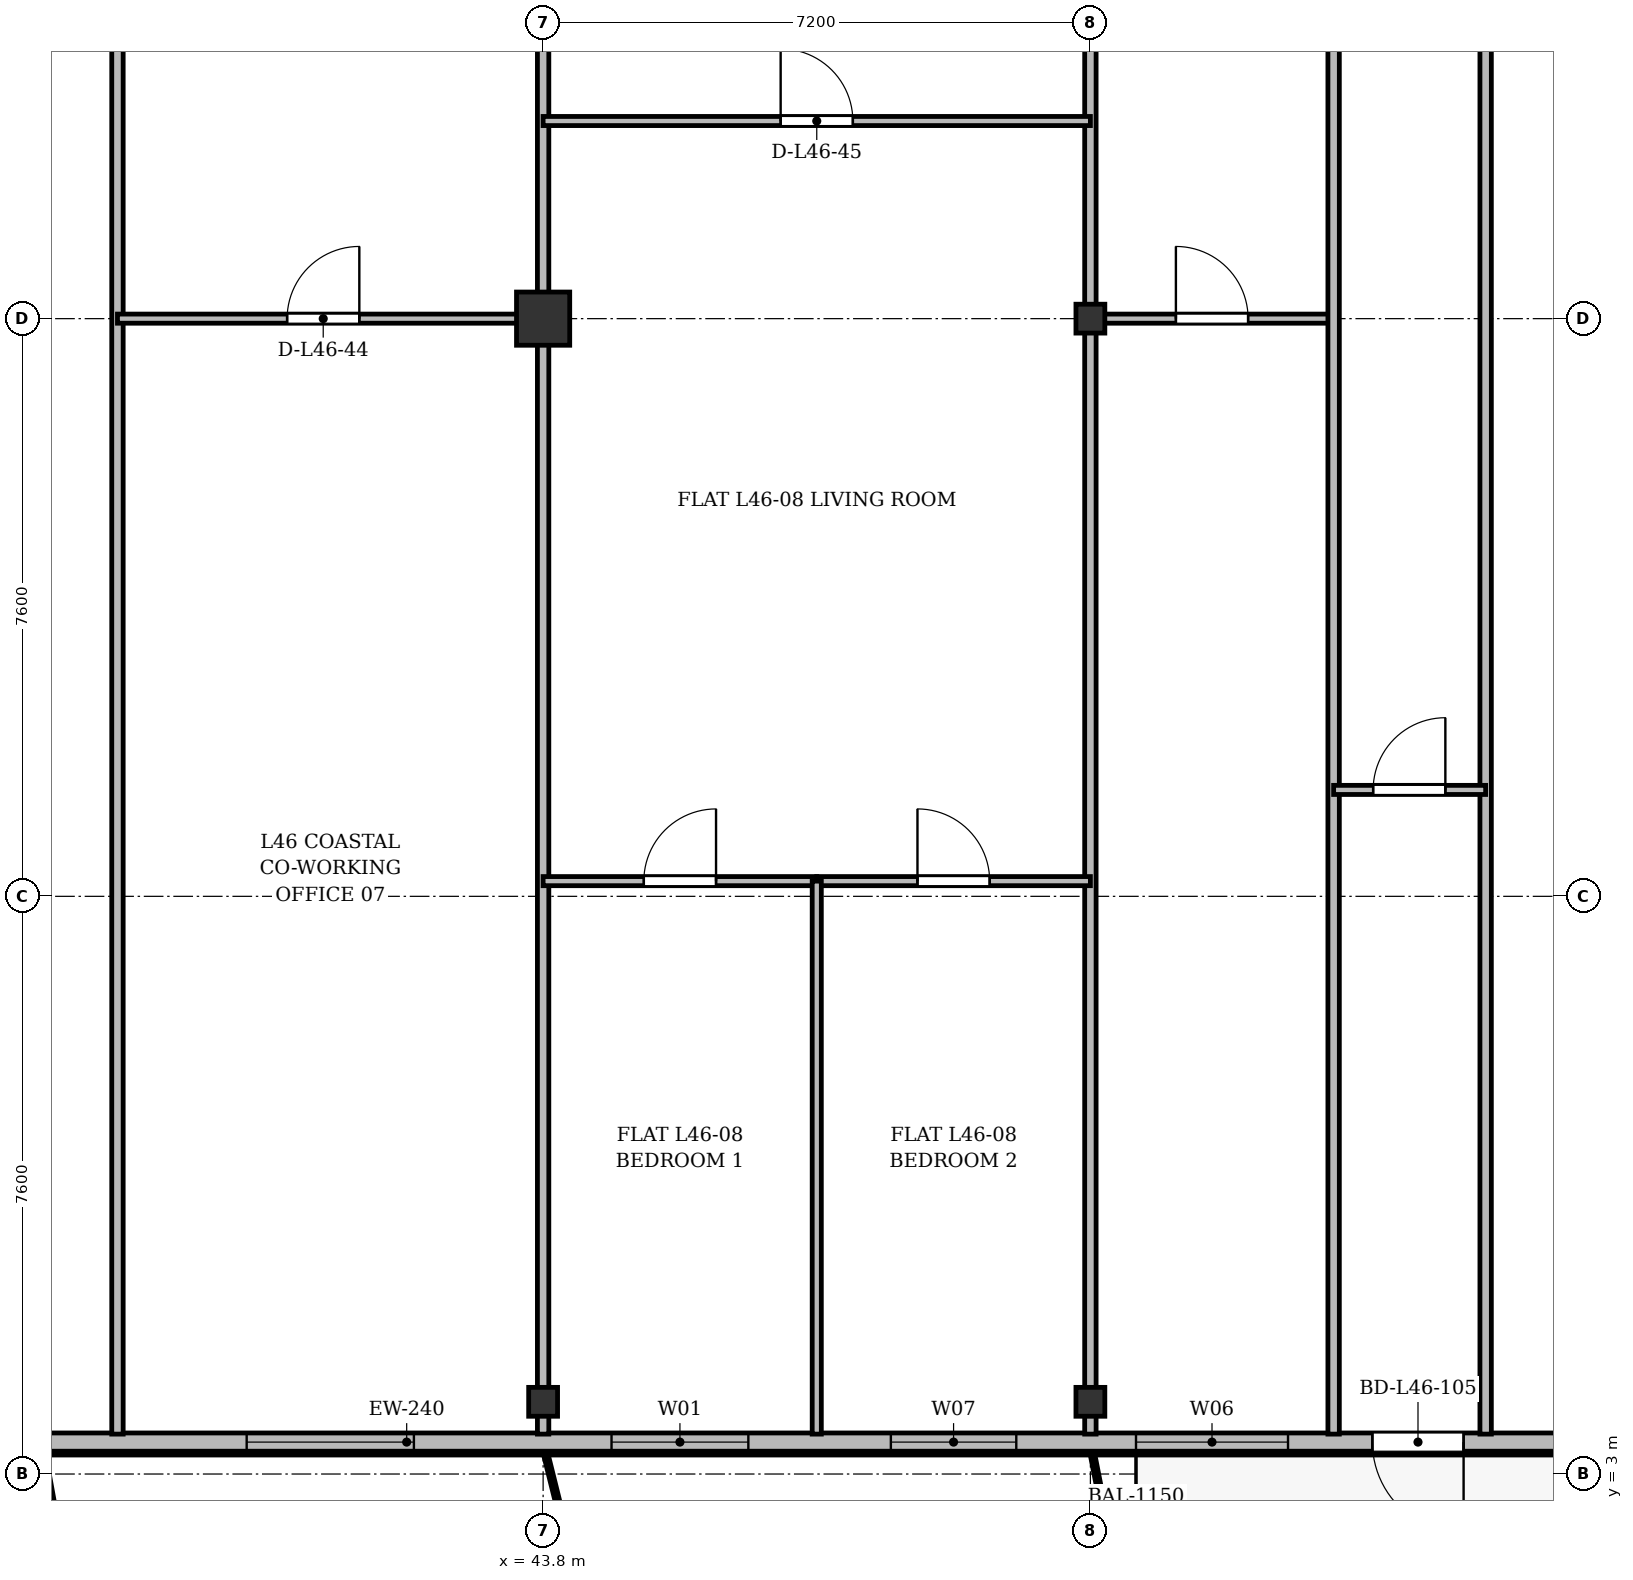
"""IFC4 building model, lengths in metres.
Left out: names, types, materials, properties, quantities, classifications, styles, units other than length and angle.
Written with IfcOpenShell. Run it as: python <this file> out.ifc"""

import sys

from ifc_helpers import new_model, si_unit, direction, frame, frame_2d, origin, origin_2d, place, context, subcontext, project, spatial, rectangle, i_section, extrude, source, transform, mapped, element, fill, save


model = new_model("IFC4")
c1 = context("Model", 3, precision=1e-05, world=origin(), true_north=direction((0.0, 1.0)))
c2 = subcontext(c1, "Body", "Model", "MODEL_VIEW")
j1 = project(units=[si_unit("LENGTHUNIT", "METRE"), si_unit("PLANEANGLEUNIT", "RADIAN")], contexts=[c1])
p1 = place(None, origin())
s1 = spatial("IfcSite", under=j1, at=p1, CompositionType="ELEMENT")
p2 = place(p1, origin())
s2 = spatial("IfcBuilding", under=s1, at=p2, CompositionType="ELEMENT")
p3 = place(p2, frame((0.0, 0.0, 175.3)))
s3 = spatial("IfcBuildingStorey", under=s2, at=p3, CompositionType="ELEMENT", Elevation=175.3)
m1 = source(origin(), c2, "Body", "SweptSolid", [
    extrude(i_section(OverallWidth=0.38, OverallDepth=0.38, WebThickness=0.02, FlangeThickness=0.03, at=origin_2d()), origin(), (0.0, 0.0, 1.0), 3.6),
])
p4 = place(p3, frame((43.8, 3.95, 0.0), z_axis=(0.0, 0.0, 1.0), x_axis=(1.0, 0.0, 0.0)))
e1 = element("IfcColumn", 1, at=p4, inside=s3, PredefinedType="COLUMN", context=c2, shape_type="MappedRepresentation", body=[
    mapped(m1, transform((0.0, 0.0, 0.0), x_axis=(1.0, 0.0, 0.0), y_axis=(0.0, 1.0, 0.0), z_axis=(0.0, 0.0, 1.0), scale=1.0)),
])
m2 = source(origin(), c2, "Body", "SweptSolid", [
    extrude(rectangle(XDim=0.7, YDim=0.7, at=origin_2d()), origin(), (0.0, 0.0, 1.0), 3.6),
])
p5 = place(p3, frame((43.8, 18.2, 0.0), z_axis=(0.0, 0.0, 1.0), x_axis=(1.0, 0.0, 0.0)))
e2 = element("IfcColumn", 2, at=p5, inside=s3, PredefinedType="COLUMN", context=c2, shape_type="MappedRepresentation", body=[
    mapped(m2, transform((0.0, 0.0, 0.0), x_axis=(1.0, 0.0, 0.0), y_axis=(0.0, 1.0, 0.0), z_axis=(0.0, 0.0, 1.0), scale=1.0)),
])
for number, where, z_axis, x_axis in (
    (3, (51.0, 3.95, 0.0), (0.0, 0.0, 1.0), (1.0, 0.0, 0.0)),
    (4, (51.0, 18.2, 0.0), (0.0, 0.0, 1.0), (1.0, 0.0, 0.0)),
):
    element("IfcColumn", number, at=place(p3, frame(where, z_axis=z_axis, x_axis=x_axis)), inside=s3, PredefinedType="COLUMN", context=c2, shape_type="MappedRepresentation", body=[
        mapped(m1, transform((0.0, 0.0, 0.0), x_axis=(1.0, 0.0, 0.0), y_axis=(0.0, 1.0, 0.0), z_axis=(0.0, 0.0, 1.0), scale=1.0)),
    ])
p6 = place(p3, frame((63.6, 3.42, 0.0), z_axis=(0.0, 0.0, 1.0), x_axis=(-1.0, 0.0, 0.0)))
e5 = element("IfcWall", 5, at=p6, inside=s3, PredefinedType="SOLIDWALL", context=c2, shape_type="SweptSolid", body=[
    extrude(rectangle(XDim=34.0, YDim=0.24, at=frame_2d((17.0, 0.0))), origin(), (0.0, 0.0, 1.0), 3.35),
])
p7 = place(p6, frame((2.645, 0.0, 0.9)))
e6 = element("IfcOpeningElement", 6, at=p7, cuts=e5, PredefinedType="OPENING", context=c2, shape_type="SweptSolid", body=[
    extrude(rectangle(XDim=2.2, YDim=1.8, at=frame_2d((1.1, 0.9))), frame((0.0, 0.13, 0.0), z_axis=(0.0, -1.0, 0.0), x_axis=(1.0, 0.0, 0.0)), (0.0, 0.0, 1.0), 0.26),
])
p8 = place(p6, frame((7.69, 0.0, 0.0)))
e7 = element("IfcOpeningElement", 7, at=p8, cuts=e5, PredefinedType="OPENING", context=c2, shape_type="SweptSolid", body=[
    extrude(rectangle(XDim=1.2, YDim=2.2, at=frame_2d((0.6, 1.1))), frame((0.0, 0.13, 0.0), z_axis=(0.0, -1.0, 0.0), x_axis=(1.0, 0.0, 0.0)), (0.0, 0.0, 1.0), 0.26),
])
p9 = place(p6, frame((10.0, 0.0, 0.9)))
e8 = element("IfcOpeningElement", 8, at=p9, cuts=e5, PredefinedType="OPENING", context=c2, shape_type="SweptSolid", body=[
    extrude(rectangle(XDim=2.0, YDim=1.95, at=frame_2d((1.0, 0.975))), frame((0.0, 0.13, 0.0), z_axis=(0.0, -1.0, 0.0), x_axis=(1.0, 0.0, 0.0)), (0.0, 0.0, 1.0), 0.26),
])
p10 = place(p6, frame((13.575, 0.0, 0.9)))
e9 = element("IfcOpeningElement", 9, at=p10, cuts=e5, PredefinedType="OPENING", context=c2, shape_type="SweptSolid", body=[
    extrude(rectangle(XDim=1.65, YDim=1.85, at=frame_2d((0.825, 0.925))), frame((0.0, 0.13, 0.0), z_axis=(0.0, -1.0, 0.0), x_axis=(1.0, 0.0, 0.0)), (0.0, 0.0, 1.0), 0.26),
])
p11 = place(p6, frame((17.1, 0.0, 0.9)))
e10 = element("IfcOpeningElement", 10, at=p11, cuts=e5, PredefinedType="OPENING", context=c2, shape_type="SweptSolid", body=[
    extrude(rectangle(XDim=1.8, YDim=1.8, at=frame_2d((0.9, 0.9))), frame((0.0, 0.13, 0.0), z_axis=(0.0, -1.0, 0.0), x_axis=(1.0, 0.0, 0.0)), (0.0, 0.0, 1.0), 0.26),
])
p12 = place(p6, frame((21.5, 0.0, 0.9)))
e11 = element("IfcOpeningElement", 11, at=p12, cuts=e5, PredefinedType="OPENING", context=c2, shape_type="SweptSolid", body=[
    extrude(rectangle(XDim=2.2, YDim=1.8, at=frame_2d((1.1, 0.9))), frame((0.0, 0.13, 0.0), z_axis=(0.0, -1.0, 0.0), x_axis=(1.0, 0.0, 0.0)), (0.0, 0.0, 1.0), 0.26),
])
p13 = place(p6, frame((28.45, 0.0, 0.9)))
e12 = element("IfcOpeningElement", 12, at=p13, cuts=e5, PredefinedType="OPENING", context=c2, shape_type="SweptSolid", body=[
    extrude(rectangle(XDim=1.5, YDim=1.75, at=frame_2d((0.75, 0.875))), frame((0.0, 0.13, 0.0), z_axis=(0.0, -1.0, 0.0), x_axis=(1.0, 0.0, 0.0)), (0.0, 0.0, 1.0), 0.26),
])
p14 = place(p3, frame((38.2, 3.525, 0.0), z_axis=(0.0, 0.0, 1.0), x_axis=(0.0, 1.0, 0.0)))
e13 = element("IfcWall", 13, at=p14, inside=s3, PredefinedType="PARTITIONING", context=c2, shape_type="SweptSolid", body=[
    extrude(rectangle(XDim=27.275, YDim=0.15, at=frame_2d((13.638, 0.0))), origin(), (0.0, 0.0, 1.0), 2.75),
])
for number, where, z_axis, x_axis in (
    (14, (43.8, 3.525, 0.0), (0.0, 0.0, 1.0), (0.0, 1.0, 0.0)),
    (15, (51.0, 3.525, 0.0), (0.0, 0.0, 1.0), (0.0, 1.0, 0.0)),
):
    element("IfcWall", number, at=place(p3, frame(where, z_axis=z_axis, x_axis=x_axis)), inside=s3, PredefinedType="PARTITIONING", context=c2, shape_type="SweptSolid", body=[
        extrude(rectangle(XDim=27.275, YDim=0.15, at=frame_2d((13.638, 0.0))), origin(), (0.0, 0.0, 1.0), 2.85),
    ])
p15 = place(p3, frame((38.2, 18.2, 0.0), z_axis=(0.0, 0.0, 1.0), x_axis=(1.0, 0.0, 0.0)))
e16 = element("IfcWall", 16, at=p15, inside=s3, PredefinedType="PARTITIONING", context=c2, shape_type="SweptSolid", body=[
    extrude(rectangle(XDim=5.6, YDim=0.12, at=frame_2d((2.8, 0.0))), origin(), (0.0, 0.0, 1.0), 2.75),
])
p16 = place(p15, frame((2.232, 0.0, 0.0)))
e17 = element("IfcOpeningElement", 17, at=p16, cuts=e16, PredefinedType="OPENING", context=c2, shape_type="SweptSolid", body=[
    extrude(rectangle(XDim=0.95, YDim=2.15, at=frame_2d((0.475, 1.075))), frame((0.0, 0.07, 0.0), z_axis=(0.0, -1.0, 0.0), x_axis=(1.0, 0.0, 0.0)), (0.0, 0.0, 1.0), 0.14),
])
p17 = place(p3, frame((43.8, 20.8, 0.0), z_axis=(0.0, 0.0, 1.0), x_axis=(1.0, 0.0, 0.0)))
e18 = element("IfcWall", 18, at=p17, inside=s3, PredefinedType="PARTITIONING", context=c2, shape_type="SweptSolid", body=[
    extrude(rectangle(XDim=7.2, YDim=0.12, at=frame_2d((3.6, 0.0))), origin(), (0.0, 0.0, 1.0), 2.85),
])
p18 = place(p17, frame((3.125, 0.0, 0.0)))
e19 = element("IfcOpeningElement", 19, at=p18, cuts=e18, PredefinedType="OPENING", context=c2, shape_type="SweptSolid", body=[
    extrude(rectangle(XDim=0.95, YDim=2.15, at=frame_2d((0.475, 1.075))), frame((0.0, 0.07, 0.0), z_axis=(0.0, -1.0, 0.0), x_axis=(1.0, 0.0, 0.0)), (0.0, 0.0, 1.0), 0.14),
])
p19 = place(p3, frame((43.8, 10.8, 0.0), z_axis=(0.0, 0.0, 1.0), x_axis=(1.0, 0.0, 0.0)))
e20 = element("IfcWall", 20, at=p19, inside=s3, PredefinedType="PARTITIONING", context=c2, shape_type="SweptSolid", body=[
    extrude(rectangle(XDim=3.6, YDim=0.12, at=frame_2d((1.8, 0.0))), origin(), (0.0, 0.0, 1.0), 2.85),
])
p20 = place(p19, frame((1.325, 0.0, 0.0)))
e21 = element("IfcOpeningElement", 21, at=p20, cuts=e20, PredefinedType="OPENING", context=c2, shape_type="SweptSolid", body=[
    extrude(rectangle(XDim=0.95, YDim=2.15, at=frame_2d((0.475, 1.075))), frame((0.0, 0.07, 0.0), z_axis=(0.0, -1.0, 0.0), x_axis=(1.0, 0.0, 0.0)), (0.0, 0.0, 1.0), 0.14),
])
p21 = place(p3, frame((47.4, 10.8, 0.0), z_axis=(0.0, 0.0, 1.0), x_axis=(1.0, 0.0, 0.0)))
e22 = element("IfcWall", 22, at=p21, inside=s3, PredefinedType="PARTITIONING", context=c2, shape_type="SweptSolid", body=[
    extrude(rectangle(XDim=3.6, YDim=0.12, at=frame_2d((1.8, 0.0))), origin(), (0.0, 0.0, 1.0), 2.85),
])
p22 = place(p21, frame((1.325, 0.0, 0.0)))
e23 = element("IfcOpeningElement", 23, at=p22, cuts=e22, PredefinedType="OPENING", context=c2, shape_type="SweptSolid", body=[
    extrude(rectangle(XDim=0.95, YDim=2.15, at=frame_2d((0.475, 1.075))), frame((0.0, 0.07, 0.0), z_axis=(0.0, -1.0, 0.0), x_axis=(1.0, 0.0, 0.0)), (0.0, 0.0, 1.0), 0.14),
])
p23 = place(p3, frame((47.4, 3.525, 0.0), z_axis=(0.0, 0.0, 1.0), x_axis=(0.0, 1.0, 0.0)))
e24 = element("IfcWall", 24, at=p23, inside=s3, PredefinedType="PARTITIONING", context=c2, shape_type="SweptSolid", body=[
    extrude(rectangle(XDim=7.275, YDim=0.12, at=frame_2d((3.638, 0.0))), origin(), (0.0, 0.0, 1.0), 2.75),
])
p24 = place(p3, frame((51.0, 18.2, 0.0), z_axis=(0.0, 0.0, 1.0), x_axis=(1.0, 0.0, 0.0)))
e25 = element("IfcWall", 25, at=p24, inside=s3, PredefinedType="PARTITIONING", context=c2, shape_type="SweptSolid", body=[
    extrude(rectangle(XDim=3.2, YDim=0.12, at=frame_2d((1.6, 0.0))), origin(), (0.0, 0.0, 1.0), 2.75),
])
p25 = place(p24, frame((1.125, 0.0, 0.0)))
e26 = element("IfcOpeningElement", 26, at=p25, cuts=e25, PredefinedType="OPENING", context=c2, shape_type="SweptSolid", body=[
    extrude(rectangle(XDim=0.95, YDim=2.15, at=frame_2d((0.475, 1.075))), frame((0.0, 0.07, 0.0), z_axis=(0.0, -1.0, 0.0), x_axis=(1.0, 0.0, 0.0)), (0.0, 0.0, 1.0), 0.14),
])
for number, where, z_axis, x_axis in (
    (27, (54.2, 3.525, 0.0), (0.0, 0.0, 1.0), (0.0, 1.0, 0.0)),
    (28, (56.2, 3.525, 0.0), (0.0, 0.0, 1.0), (0.0, 1.0, 0.0)),
):
    element("IfcWall", number, at=place(p3, frame(where, z_axis=z_axis, x_axis=x_axis)), inside=s3, PredefinedType="PARTITIONING", context=c2, shape_type="SweptSolid", body=[
        extrude(rectangle(XDim=27.275, YDim=0.15, at=frame_2d((13.638, 0.0))), origin(), (0.0, 0.0, 1.0), 2.75),
    ])
p26 = place(p3, frame((54.2, 12.0, 0.0), z_axis=(0.0, 0.0, 1.0), x_axis=(1.0, 0.0, 0.0)))
e29 = element("IfcWall", 29, at=p26, inside=s3, PredefinedType="PARTITIONING", context=c2, shape_type="SweptSolid", body=[
    extrude(rectangle(XDim=2.0, YDim=0.12, at=frame_2d((1.0, 0.0))), origin(), (0.0, 0.0, 1.0), 3.35),
])
p27 = place(p26, frame((0.52, 0.0, 0.0)))
e30 = element("IfcOpeningElement", 30, at=p27, cuts=e29, PredefinedType="OPENING", context=c2, shape_type="SweptSolid", body=[
    extrude(rectangle(XDim=0.95, YDim=2.15, at=frame_2d((0.475, 1.075))), frame((0.0, 0.07, 0.0), z_axis=(0.0, -1.0, 0.0), x_axis=(1.0, 0.0, 0.0)), (0.0, 0.0, 1.0), 0.14),
])
m3 = source(origin(), c2, "Body", "SweptSolid", [
    extrude(rectangle(XDim=1.2, YDim=2.2, at=frame_2d((0.6, 1.1))), frame((0.0, 0.025, 0.0), z_axis=(0.0, -1.0, 0.0), x_axis=(1.0, 0.0, 0.0)), (0.0, 0.0, 1.0), 0.05),
])
p28 = place(p8, origin())
e31 = element("IfcDoor", 31, at=p28, inside=s3, OperationType="SINGLE_SWING_LEFT", PredefinedType="DOOR", context=c2, shape_type="MappedRepresentation", body=[
    mapped(m3, transform((0.0, 0.0, 0.0), x_axis=(1.0, 0.0, 0.0), y_axis=(0.0, 1.0, 0.0), z_axis=(0.0, 0.0, 1.0), scale=1.0)),
])
fill(e7, e31)
m4 = source(origin(), c2, "Body", "SweptSolid", [
    extrude(rectangle(XDim=2.0, YDim=1.95, at=frame_2d((1.0, 0.975))), frame((0.0, 0.03, 0.0), z_axis=(0.0, -1.0, 0.0), x_axis=(1.0, 0.0, 0.0)), (0.0, 0.0, 1.0), 0.06),
])
p29 = place(p9, origin())
e32 = element("IfcWindow", 32, at=p29, inside=s3, PartitioningType="SINGLE_PANEL", PredefinedType="WINDOW", context=c2, shape_type="MappedRepresentation", body=[
    mapped(m4, transform((0.0, 0.0, 0.0), x_axis=(1.0, 0.0, 0.0), y_axis=(0.0, 1.0, 0.0), z_axis=(0.0, 0.0, 1.0), scale=1.0)),
])
fill(e8, e32)
m5 = source(origin(), c2, "Body", "SweptSolid", [
    extrude(rectangle(XDim=1.65, YDim=1.85, at=frame_2d((0.825, 0.925))), frame((0.0, 0.03, 0.0), z_axis=(0.0, -1.0, 0.0), x_axis=(1.0, 0.0, 0.0)), (0.0, 0.0, 1.0), 0.06),
])
p30 = place(p10, origin())
e33 = element("IfcWindow", 33, at=p30, inside=s3, PartitioningType="SINGLE_PANEL", PredefinedType="WINDOW", context=c2, shape_type="MappedRepresentation", body=[
    mapped(m5, transform((0.0, 0.0, 0.0), x_axis=(1.0, 0.0, 0.0), y_axis=(0.0, 1.0, 0.0), z_axis=(0.0, 0.0, 1.0), scale=1.0)),
])
fill(e9, e33)
m6 = source(origin(), c2, "Body", "SweptSolid", [
    extrude(rectangle(XDim=1.8, YDim=1.8, at=frame_2d((0.9, 0.9))), frame((0.0, 0.03, 0.0), z_axis=(0.0, -1.0, 0.0), x_axis=(1.0, 0.0, 0.0)), (0.0, 0.0, 1.0), 0.06),
])
p31 = place(p11, origin())
e34 = element("IfcWindow", 34, at=p31, inside=s3, PartitioningType="SINGLE_PANEL", PredefinedType="WINDOW", context=c2, shape_type="MappedRepresentation", body=[
    mapped(m6, transform((0.0, 0.0, 0.0), x_axis=(1.0, 0.0, 0.0), y_axis=(0.0, 1.0, 0.0), z_axis=(0.0, 0.0, 1.0), scale=1.0)),
])
fill(e10, e34)
m7 = source(origin(), c2, "Body", "SweptSolid", [
    extrude(rectangle(XDim=2.2, YDim=1.8, at=frame_2d((1.1, 0.9))), frame((0.0, 0.03, 0.0), z_axis=(0.0, -1.0, 0.0), x_axis=(1.0, 0.0, 0.0)), (0.0, 0.0, 1.0), 0.06),
])
p32 = place(p12, origin())
e35 = element("IfcWindow", 35, at=p32, inside=s3, PartitioningType="SINGLE_PANEL", PredefinedType="WINDOW", context=c2, shape_type="MappedRepresentation", body=[
    mapped(m7, transform((0.0, 0.0, 0.0), x_axis=(1.0, 0.0, 0.0), y_axis=(0.0, 1.0, 0.0), z_axis=(0.0, 0.0, 1.0), scale=1.0)),
])
fill(e11, e35)
m8 = source(origin(), c2, "Body", "SweptSolid", [
    extrude(rectangle(XDim=0.95, YDim=2.15, at=frame_2d((0.475, 1.075))), frame((0.0, 0.025, 0.0), z_axis=(0.0, -1.0, 0.0), x_axis=(1.0, 0.0, 0.0)), (0.0, 0.0, 1.0), 0.05),
])
p33 = place(p16, origin())
e36 = element("IfcDoor", 36, at=p33, inside=s3, OperationType="SINGLE_SWING_RIGHT", PredefinedType="DOOR", context=c2, shape_type="MappedRepresentation", body=[
    mapped(m8, transform((0.0, 0.0, 0.0), x_axis=(1.0, 0.0, 0.0), y_axis=(0.0, 1.0, 0.0), z_axis=(0.0, 0.0, 1.0), scale=1.0)),
])
fill(e17, e36)
p34 = place(p18, origin())
e37 = element("IfcDoor", 37, at=p34, inside=s3, OperationType="SINGLE_SWING_LEFT", PredefinedType="DOOR", context=c2, shape_type="MappedRepresentation", body=[
    mapped(m8, transform((0.0, 0.0, 0.0), x_axis=(1.0, 0.0, 0.0), y_axis=(0.0, 1.0, 0.0), z_axis=(0.0, 0.0, 1.0), scale=1.0)),
])
fill(e19, e37)
p35 = place(p20, origin())
e38 = element("IfcDoor", 38, at=p35, inside=s3, OperationType="SINGLE_SWING_RIGHT", PredefinedType="DOOR", context=c2, shape_type="MappedRepresentation", body=[
    mapped(m8, transform((0.0, 0.0, 0.0), x_axis=(1.0, 0.0, 0.0), y_axis=(0.0, 1.0, 0.0), z_axis=(0.0, 0.0, 1.0), scale=1.0)),
])
fill(e21, e38)
p36 = place(p22, origin())
e39 = element("IfcDoor", 39, at=p36, inside=s3, OperationType="SINGLE_SWING_LEFT", PredefinedType="DOOR", context=c2, shape_type="MappedRepresentation", body=[
    mapped(m8, transform((0.0, 0.0, 0.0), x_axis=(1.0, 0.0, 0.0), y_axis=(0.0, 1.0, 0.0), z_axis=(0.0, 0.0, 1.0), scale=1.0)),
])
fill(e23, e39)
p37 = place(p25, origin())
e40 = element("IfcDoor", 40, at=p37, inside=s3, OperationType="SINGLE_SWING_LEFT", PredefinedType="DOOR", context=c2, shape_type="MappedRepresentation", body=[
    mapped(m8, transform((0.0, 0.0, 0.0), x_axis=(1.0, 0.0, 0.0), y_axis=(0.0, 1.0, 0.0), z_axis=(0.0, 0.0, 1.0), scale=1.0)),
])
fill(e26, e40)
p38 = place(p27, origin())
e41 = element("IfcDoor", 41, at=p38, inside=s3, OperationType="SINGLE_SWING_RIGHT", PredefinedType="DOOR", context=c2, shape_type="MappedRepresentation", body=[
    mapped(m8, transform((0.0, 0.0, 0.0), x_axis=(1.0, 0.0, 0.0), y_axis=(0.0, 1.0, 0.0), z_axis=(0.0, 0.0, 1.0), scale=1.0)),
])
fill(e30, e41)
save(model, sys.argv[1])
